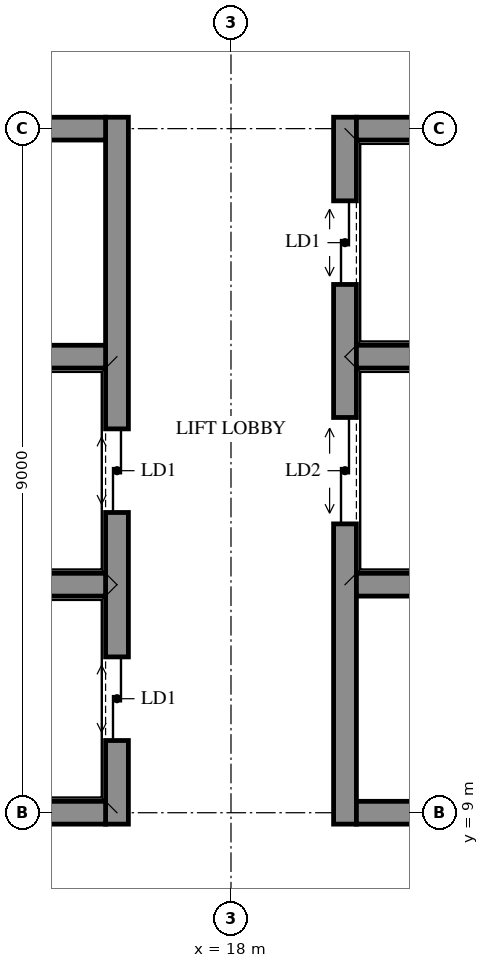
"""IFC4 building model, lengths in metres.
Left out: names, types, materials, properties, quantities, classifications, styles, units other than length and angle.
Written with IfcOpenShell. Run it as: python <this file> out.ifc"""

import sys

from ifc_helpers import new_model, si_unit, direction, frame, frame_2d, origin, place, context, subcontext, project, spatial, rectangle, extrude, element, fill, save


model = new_model("IFC4")
c1 = context("Model", 3, precision=1e-05, world=origin(), true_north=direction((0.0, 1.0)))
c2 = subcontext(c1, "Body", "Model", "MODEL_VIEW")
j1 = project(units=[si_unit("LENGTHUNIT", "METRE"), si_unit("PLANEANGLEUNIT", "RADIAN")], contexts=[c1])
p1 = place(None, origin())
s1 = spatial("IfcSite", under=j1, at=p1, CompositionType="ELEMENT")
p2 = place(p1, origin())
s2 = spatial("IfcBuilding", under=s1, at=p2, CompositionType="ELEMENT")
p3 = place(p2, frame((0.0, 0.0, 48.6)))
s3 = spatial("IfcBuildingStorey", under=s2, at=p3, CompositionType="ELEMENT", Elevation=48.6)
p4 = place(p3, frame((16.5, 8.85, 0.0), z_axis=(0.0, 0.0, 1.0), x_axis=(0.0, 1.0, 0.0)))
e1 = element("IfcWall", 1, at=p4, inside=s3, PredefinedType="SHEAR", context=c2, shape_type="SweptSolid", body=[
    extrude(rectangle(XDim=9.3, YDim=0.3, at=frame_2d((4.65, 0.0))), origin(), (0.0, 0.0, 1.0), 4.2),
])
p5 = place(p4, frame((1.1, 0.0, 0.0)))
e2 = element("IfcOpeningElement", 2, at=p5, cuts=e1, PredefinedType="OPENING", context=c2, shape_type="SweptSolid", body=[
    extrude(rectangle(XDim=1.1, YDim=2.1, at=frame_2d((0.55, 1.05))), frame((0.0, 0.16, 0.0), z_axis=(0.0, -1.0, 0.0), x_axis=(1.0, 0.0, 0.0)), (0.0, 0.0, 1.0), 0.32),
])
p6 = place(p4, frame((4.1, 0.0, 0.0)))
e3 = element("IfcOpeningElement", 3, at=p6, cuts=e1, PredefinedType="OPENING", context=c2, shape_type="SweptSolid", body=[
    extrude(rectangle(XDim=1.1, YDim=2.1, at=frame_2d((0.55, 1.05))), frame((0.0, 0.16, 0.0), z_axis=(0.0, -1.0, 0.0), x_axis=(1.0, 0.0, 0.0)), (0.0, 0.0, 1.0), 0.32),
])
p7 = place(p3, frame((19.5, 8.85, 0.0), z_axis=(0.0, 0.0, 1.0), x_axis=(0.0, 1.0, 0.0)))
e4 = element("IfcWall", 4, at=p7, inside=s3, PredefinedType="SHEAR", context=c2, shape_type="SweptSolid", body=[
    extrude(rectangle(XDim=9.3, YDim=0.3, at=frame_2d((4.65, 0.0))), origin(), (0.0, 0.0, 1.0), 4.2),
])
p8 = place(p7, frame((3.95, 0.0, 0.0)))
e5 = element("IfcOpeningElement", 5, at=p8, cuts=e4, PredefinedType="OPENING", context=c2, shape_type="SweptSolid", body=[
    extrude(rectangle(XDim=1.4, YDim=2.1, at=frame_2d((0.7, 1.05))), frame((0.0, 0.16, 0.0), z_axis=(0.0, -1.0, 0.0), x_axis=(1.0, 0.0, 0.0)), (0.0, 0.0, 1.0), 0.32),
])
p9 = place(p7, frame((7.1, 0.0, 0.0)))
e6 = element("IfcOpeningElement", 6, at=p9, cuts=e4, PredefinedType="OPENING", context=c2, shape_type="SweptSolid", body=[
    extrude(rectangle(XDim=1.1, YDim=2.1, at=frame_2d((0.55, 1.05))), frame((0.0, 0.16, 0.0), z_axis=(0.0, -1.0, 0.0), x_axis=(1.0, 0.0, 0.0)), (0.0, 0.0, 1.0), 0.32),
])
for number, where, z_axis, x_axis in (
    (7, (13.65, 9.0, 0.0), (0.0, 0.0, 1.0), (1.0, 0.0, 0.0)),
    (8, (19.65, 9.0, 0.0), (0.0, 0.0, 1.0), (1.0, 0.0, 0.0)),
    (9, (13.65, 12.0, 0.0), (0.0, 0.0, 1.0), (1.0, 0.0, 0.0)),
    (10, (19.65, 12.0, 0.0), (0.0, 0.0, 1.0), (1.0, 0.0, 0.0)),
    (11, (13.65, 15.0, 0.0), (0.0, 0.0, 1.0), (1.0, 0.0, 0.0)),
    (12, (19.65, 15.0, 0.0), (0.0, 0.0, 1.0), (1.0, 0.0, 0.0)),
    (13, (13.65, 18.0, 0.0), (0.0, 0.0, 1.0), (1.0, 0.0, 0.0)),
    (14, (19.65, 18.0, 0.0), (0.0, 0.0, 1.0), (1.0, 0.0, 0.0)),
):
    element("IfcWall", number, at=place(p3, frame(where, z_axis=z_axis, x_axis=x_axis)), inside=s3, PredefinedType="SHEAR", context=c2, shape_type="SweptSolid", body=[
        extrude(rectangle(XDim=2.7, YDim=0.3, at=frame_2d((1.35, 0.0))), origin(), (0.0, 0.0, 1.0), 4.2),
    ])
p10 = place(p5, origin())
e15 = element("IfcDoor", 15, at=p10, inside=s3, OperationType="DOUBLE_DOOR_SLIDING", PredefinedType="DOOR", context=c2, shape_type="SweptSolid", body=[
    extrude(rectangle(XDim=1.1, YDim=2.1, at=frame_2d((0.55, 1.05))), frame((0.0, 0.025, 0.0), z_axis=(0.0, -1.0, 0.0), x_axis=(1.0, 0.0, 0.0)), (0.0, 0.0, 1.0), 0.05),
])
fill(e2, e15)
p11 = place(p6, origin())
e16 = element("IfcDoor", 16, at=p11, inside=s3, OperationType="DOUBLE_DOOR_SLIDING", PredefinedType="DOOR", context=c2, shape_type="SweptSolid", body=[
    extrude(rectangle(XDim=1.1, YDim=2.1, at=frame_2d((0.55, 1.05))), frame((0.0, 0.025, 0.0), z_axis=(0.0, -1.0, 0.0), x_axis=(1.0, 0.0, 0.0)), (0.0, 0.0, 1.0), 0.05),
])
fill(e3, e16)
p12 = place(p8, origin())
e17 = element("IfcDoor", 17, at=p12, inside=s3, OperationType="DOUBLE_DOOR_SLIDING", PredefinedType="DOOR", context=c2, shape_type="SweptSolid", body=[
    extrude(rectangle(XDim=1.4, YDim=2.1, at=frame_2d((0.7, 1.05))), frame((0.0, 0.025, 0.0), z_axis=(0.0, -1.0, 0.0), x_axis=(1.0, 0.0, 0.0)), (0.0, 0.0, 1.0), 0.05),
])
fill(e5, e17)
p13 = place(p9, origin())
e18 = element("IfcDoor", 18, at=p13, inside=s3, OperationType="DOUBLE_DOOR_SLIDING", PredefinedType="DOOR", context=c2, shape_type="SweptSolid", body=[
    extrude(rectangle(XDim=1.1, YDim=2.1, at=frame_2d((0.55, 1.05))), frame((0.0, 0.025, 0.0), z_axis=(0.0, -1.0, 0.0), x_axis=(1.0, 0.0, 0.0)), (0.0, 0.0, 1.0), 0.05),
])
fill(e6, e18)
save(model, sys.argv[1])
